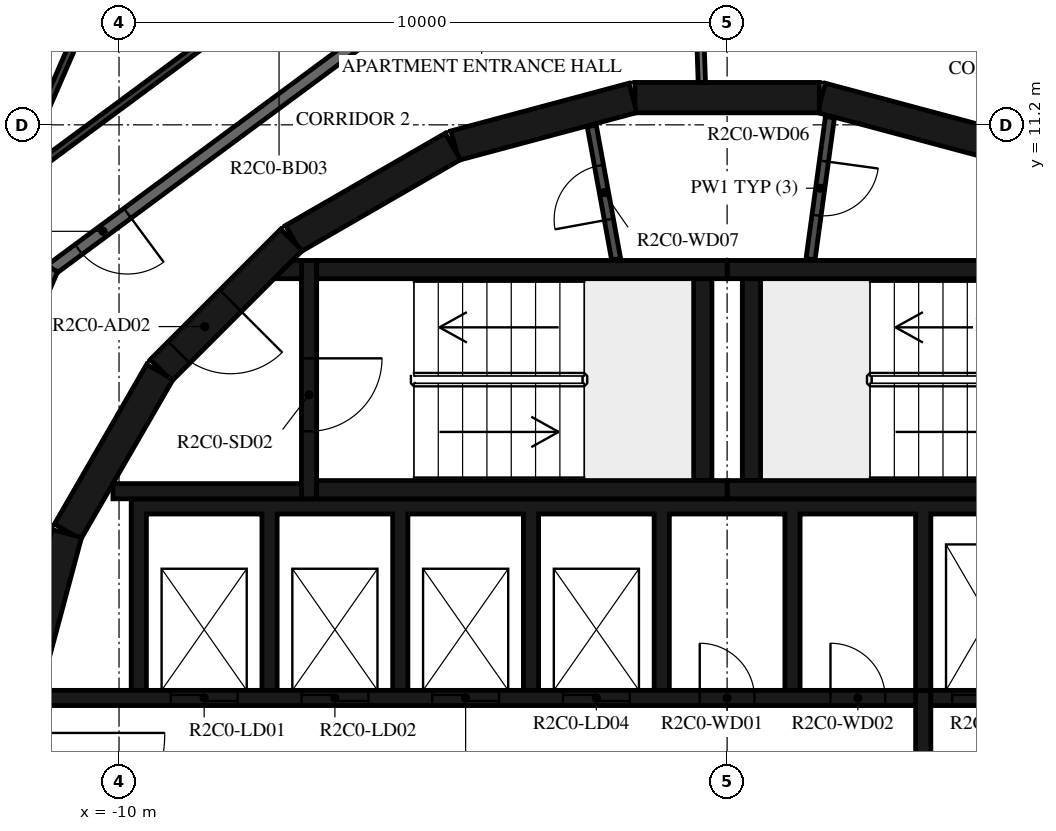
"""IFC4 building model, lengths in metres.
Left out: names, types, materials, properties, quantities, classifications, styles, units other than length and angle.
Written with IfcOpenShell. Run it as: python <this file> out.ifc"""

import sys

from ifc_helpers import new_model, si_unit, direction, frame, frame_2d, origin, place, context, subcontext, project, spatial, polyline, rectangle, outline, extrude, element, fill, save


model = new_model("IFC4")
c1 = context("Model", 3, precision=1e-05, world=origin(), true_north=direction((0.0, 1.0)))
c2 = subcontext(c1, "Body", "Model", "MODEL_VIEW")
j1 = project(units=[si_unit("LENGTHUNIT", "METRE"), si_unit("PLANEANGLEUNIT", "RADIAN")], contexts=[c1])
p1 = place(None, origin())
s1 = spatial("IfcSite", under=j1, at=p1, CompositionType="ELEMENT")
p2 = place(p1, origin())
s2 = spatial("IfcBuilding", under=s1, at=p2, CompositionType="ELEMENT")
p3 = place(p2, frame((0.0, 0.0, 104.7)))
s3 = spatial("IfcBuildingStorey", under=s2, at=p3, CompositionType="ELEMENT", Elevation=104.7)
for number, where, z_axis, x_axis in (
    (1, (4.479, 10.858, 0.0), (0.0, 0.0, 1.0), (-0.966, 0.259, 0.0)),
    (2, (1.516, 11.647, 0.0), (0.0, 0.0, 1.0), (-1.0, 0.0, 0.0)),
    (3, (-1.55, 11.643, 0.0), (0.0, 0.0, 1.0), (-0.966, -0.259, 0.0)),
    (4, (-4.51, 10.845, 0.0), (0.0, 0.0, 1.0), (-0.866, -0.5, 0.0)),
):
    element("IfcWall", number, at=place(p3, frame(where, z_axis=z_axis, x_axis=x_axis)), inside=s3, PredefinedType="SHEAR", context=c2, shape_type="SweptSolid", body=[
        extrude(rectangle(XDim=3.033, YDim=0.5, at=frame_2d((1.516, 0.0))), origin(), (0.0, 0.0, 1.0), 3.05),
    ])
p4 = place(p3, frame((-7.164, 9.308, 0.0), z_axis=(0.0, 0.0, 1.0), x_axis=(-0.707106781187, -0.707106781187, 0.0)))
e5 = element("IfcWall", 5, at=p4, inside=s3, PredefinedType="SHEAR", context=c2, shape_type="SweptSolid", body=[
    extrude(rectangle(XDim=3.032, YDim=0.5, at=frame_2d((1.516, 0.0))), origin(), (0.0, 0.0, 1.0), 3.05),
])
p5 = place(p4, frame((1.416, 0.0, 0.0)))
e6 = element("IfcOpeningElement", 6, at=p5, cuts=e5, PredefinedType="OPENING", context=c2, shape_type="SweptSolid", body=[
    extrude(rectangle(XDim=1.2, YDim=2.1, at=frame_2d((0.6, 1.05))), frame((0.0, 0.26, 0.0), z_axis=(0.0, -1.0, 0.0), x_axis=(1.0, 0.0, 0.0)), (0.0, 0.0, 1.0), 0.52),
])
for number, where, z_axis, x_axis in (
    (7, (-9.329, 7.137, 0.0), (0.0, 0.0, 1.0), (-0.5, -0.866, 0.0)),
    (8, (-10.858, 4.479, 0.0), (0.0, 0.0, 1.0), (-0.259, -0.966, 0.0)),
):
    element("IfcWall", number, at=place(p3, frame(where, z_axis=z_axis, x_axis=x_axis)), inside=s3, PredefinedType="SHEAR", context=c2, shape_type="SweptSolid", body=[
        extrude(rectangle(XDim=3.033, YDim=0.5, at=frame_2d((1.516, 0.0))), origin(), (0.0, 0.0, 1.0), 3.05),
    ])
for number, where, z_axis, x_axis in (
    (9, (0.0, 5.2, 0.0), (0.0, 0.0, 1.0), (1.0, 0.0, 0.0)),
    (10, (0.0, 8.82, 0.0), (0.0, 0.0, 1.0), (1.0, 0.0, 0.0)),
):
    element("IfcWall", number, at=place(p3, frame(where, z_axis=z_axis, x_axis=x_axis)), inside=s3, PredefinedType="SHEAR", context=c2, shape_type="SweptSolid", body=[
        extrude(rectangle(XDim=6.75, YDim=0.3, at=frame_2d((3.375, 0.0))), origin(), (0.0, 0.0, 1.0), 3.05),
    ])
p6 = place(p3, frame((0.4, 5.35, 0.0), z_axis=(0.0, 0.0, 1.0), x_axis=(0.0, 1.0, 0.0)))
e11 = element("IfcWall", 11, at=p6, inside=s3, PredefinedType="SHEAR", context=c2, shape_type="SweptSolid", body=[
    extrude(rectangle(XDim=3.32, YDim=0.3, at=frame_2d((1.66, 0.0))), origin(), (0.0, 0.0, 1.0), 3.05),
])
for number, where, z_axis, x_axis in (
    (12, (-6.75, 5.2, 0.0), (0.0, 0.0, 1.0), (1.0, 0.0, 0.0)),
    (13, (-6.75, 8.82, 0.0), (0.0, 0.0, 1.0), (1.0, 0.0, 0.0)),
):
    element("IfcWall", number, at=place(p3, frame(where, z_axis=z_axis, x_axis=x_axis)), inside=s3, PredefinedType="SHEAR", context=c2, shape_type="SweptSolid", body=[
        extrude(rectangle(XDim=6.75, YDim=0.3, at=frame_2d((3.375, 0.0))), origin(), (0.0, 0.0, 1.0), 3.05),
    ])
p7 = place(p3, frame((-0.4, 5.35, 0.0), z_axis=(0.0, 0.0, 1.0), x_axis=(0.0, 1.0, 0.0)))
e14 = element("IfcWall", 14, at=p7, inside=s3, PredefinedType="SHEAR", context=c2, shape_type="SweptSolid", body=[
    extrude(rectangle(XDim=3.32, YDim=0.3, at=frame_2d((1.66, 0.0))), origin(), (0.0, 0.0, 1.0), 3.05),
])
p8 = place(p3, frame((-6.875, 8.97, 0.0), z_axis=(0.0, 0.0, 1.0), x_axis=(0.0, -1.0, 0.0)))
e15 = element("IfcWall", 15, at=p8, inside=s3, PredefinedType="SHEAR", context=c2, shape_type="SweptSolid", body=[
    extrude(rectangle(XDim=3.92, YDim=0.25, at=frame_2d((1.96, 0.0))), origin(), (0.0, 0.0, 1.0), 3.05),
])
p9 = place(p8, frame((1.61, 0.0, 0.0)))
e16 = element("IfcOpeningElement", 16, at=p9, cuts=e15, PredefinedType="OPENING", context=c2, shape_type="SweptSolid", body=[
    extrude(rectangle(XDim=1.2, YDim=2.1, at=frame_2d((0.6, 1.05))), frame((0.0, 0.135, 0.0), z_axis=(0.0, -1.0, 0.0), x_axis=(1.0, 0.0, 0.0)), (0.0, 0.0, 1.0), 0.27),
])
p10 = place(p3, frame((-7.0, 5.175, 0.0), z_axis=(0.0, 0.0, 1.0), x_axis=(-1.0, 0.0, 0.0)))
e17 = element("IfcWall", 17, at=p10, inside=s3, PredefinedType="SHEAR", context=c2, shape_type="SweptSolid", body=[
    extrude(rectangle(XDim=3.1, YDim=0.25, at=frame_2d((1.55, 0.0))), origin(), (0.0, 0.0, 1.0), 3.05),
])
p11 = place(p3, origin())
e18 = element("IfcWall", 18, at=p11, inside=s3, PredefinedType="SHEAR", context=c2, shape_type="SweptSolid", body=[
    extrude(outline(polyline([(-7.148, 8.97), (-7.0, 8.97), (-7.0, 8.67), (-7.448, 8.67), (-7.148, 8.97)])), origin(), (0.0, 0.0, 1.0), 3.05),
])
p12 = place(p3, origin())
e19 = element("IfcWall", 19, at=p12, inside=s3, PredefinedType="SHEAR", context=c2, shape_type="SweptSolid", body=[
    extrude(outline(polyline([(-9.55, 4.8), (-7.65, 4.8), (-7.65, 1.9), (-7.4, 1.9), (-7.4, 4.8), (-5.5, 4.8), (-5.5, 1.9), (-5.25, 1.9), (-5.25, 4.8), (-3.35, 4.8), (-3.35, 1.9), (-3.1, 1.9), (-3.1, 4.8), (-1.2, 4.8), (-1.2, 1.9), (-0.95, 1.9), (-0.95, 4.8), (0.95, 4.8), (0.95, 1.9), (1.2, 1.9), (1.2, 4.8), (3.1, 4.8), (3.1, 1.9), (3.35, 1.9), (3.35, 4.8), (5.25, 4.8), (5.25, 1.9), (5.5, 1.9), (5.5, 4.8), (7.4, 4.8), (7.4, 1.9), (7.65, 1.9), (7.65, 4.8), (9.55, 4.8), (9.55, 1.9), (9.8, 1.9), (9.8, 4.8), (9.8, 5.05), (-9.8, 5.05), (-9.8, 4.8), (-9.8, 1.9), (-9.55, 1.9), (-9.55, 4.8)])), origin(), (0.0, 0.0, 1.0), 3.05),
])
p13 = place(p3, frame((-11.28, 1.775, 0.0), z_axis=(0.0, 0.0, 1.0), x_axis=(1.0, 0.0, 0.0)))
e20 = element("IfcWall", 20, at=p13, inside=s3, PredefinedType="SHEAR", context=c2, shape_type="SweptSolid", body=[
    extrude(rectangle(XDim=14.38, YDim=0.25, at=frame_2d((7.19, 0.0))), origin(), (0.0, 0.0, 1.0), 3.05),
])
p14 = place(p13, frame((2.13, 0.0, 0.0)))
e21 = element("IfcOpeningElement", 21, at=p14, cuts=e20, PredefinedType="OPENING", context=c2, shape_type="SweptSolid", body=[
    extrude(rectangle(XDim=1.1, YDim=2.1, at=frame_2d((0.55, 1.05))), frame((0.0, 0.135, 0.0), z_axis=(0.0, -1.0, 0.0), x_axis=(1.0, 0.0, 0.0)), (0.0, 0.0, 1.0), 0.27),
])
p15 = place(p13, frame((4.28, 0.0, 0.0)))
e22 = element("IfcOpeningElement", 22, at=p15, cuts=e20, PredefinedType="OPENING", context=c2, shape_type="SweptSolid", body=[
    extrude(rectangle(XDim=1.1, YDim=2.1, at=frame_2d((0.55, 1.05))), frame((0.0, 0.135, 0.0), z_axis=(0.0, -1.0, 0.0), x_axis=(1.0, 0.0, 0.0)), (0.0, 0.0, 1.0), 0.27),
])
p16 = place(p13, frame((6.43, 0.0, 0.0)))
e23 = element("IfcOpeningElement", 23, at=p16, cuts=e20, PredefinedType="OPENING", context=c2, shape_type="SweptSolid", body=[
    extrude(rectangle(XDim=1.1, YDim=2.1, at=frame_2d((0.55, 1.05))), frame((0.0, 0.135, 0.0), z_axis=(0.0, -1.0, 0.0), x_axis=(1.0, 0.0, 0.0)), (0.0, 0.0, 1.0), 0.27),
])
p17 = place(p13, frame((8.58, 0.0, 0.0)))
e24 = element("IfcOpeningElement", 24, at=p17, cuts=e20, PredefinedType="OPENING", context=c2, shape_type="SweptSolid", body=[
    extrude(rectangle(XDim=1.1, YDim=2.1, at=frame_2d((0.55, 1.05))), frame((0.0, 0.135, 0.0), z_axis=(0.0, -1.0, 0.0), x_axis=(1.0, 0.0, 0.0)), (0.0, 0.0, 1.0), 0.27),
])
p18 = place(p13, frame((10.83, 0.0, 0.0)))
e25 = element("IfcOpeningElement", 25, at=p18, cuts=e20, PredefinedType="OPENING", context=c2, shape_type="SweptSolid", body=[
    extrude(rectangle(XDim=0.9, YDim=2.1, at=frame_2d((0.45, 1.05))), frame((0.0, 0.135, 0.0), z_axis=(0.0, -1.0, 0.0), x_axis=(1.0, 0.0, 0.0)), (0.0, 0.0, 1.0), 0.27),
])
p19 = place(p13, frame((12.98, 0.0, 0.0)))
e26 = element("IfcOpeningElement", 26, at=p19, cuts=e20, PredefinedType="OPENING", context=c2, shape_type="SweptSolid", body=[
    extrude(rectangle(XDim=0.9, YDim=2.1, at=frame_2d((0.45, 1.05))), frame((0.0, 0.135, 0.0), z_axis=(0.0, -1.0, 0.0), x_axis=(1.0, 0.0, 0.0)), (0.0, 0.0, 1.0), 0.27),
])
p20 = place(p3, frame((3.35, 1.775, 0.0), z_axis=(0.0, 0.0, 1.0), x_axis=(1.0, 0.0, 0.0)))
e27 = element("IfcWall", 27, at=p20, inside=s3, PredefinedType="SHEAR", context=c2, shape_type="SweptSolid", body=[
    extrude(rectangle(XDim=7.93, YDim=0.25, at=frame_2d((3.965, 0.0))), origin(), (0.0, 0.0, 1.0), 3.05),
])
p21 = place(p20, frame((0.35, 0.0, 0.0)))
e28 = element("IfcOpeningElement", 28, at=p21, cuts=e27, PredefinedType="OPENING", context=c2, shape_type="SweptSolid", body=[
    extrude(rectangle(XDim=1.2, YDim=2.4, at=frame_2d((0.6, 1.2))), frame((0.0, 0.135, 0.0), z_axis=(0.0, -1.0, 0.0), x_axis=(1.0, 0.0, 0.0)), (0.0, 0.0, 1.0), 0.27),
])
p22 = place(p20, frame((2.5, 0.0, 0.0)))
e29 = element("IfcOpeningElement", 29, at=p22, cuts=e27, PredefinedType="OPENING", context=c2, shape_type="SweptSolid", body=[
    extrude(rectangle(XDim=1.2, YDim=2.4, at=frame_2d((0.6, 1.2))), frame((0.0, 0.135, 0.0), z_axis=(0.0, -1.0, 0.0), x_axis=(1.0, 0.0, 0.0)), (0.0, 0.0, 1.0), 0.27),
])
p23 = place(p20, frame((4.8, 0.0, 0.0)))
e30 = element("IfcOpeningElement", 30, at=p23, cuts=e27, PredefinedType="OPENING", context=c2, shape_type="SweptSolid", body=[
    extrude(rectangle(XDim=0.9, YDim=2.1, at=frame_2d((0.45, 1.05))), frame((0.0, 0.135, 0.0), z_axis=(0.0, -1.0, 0.0), x_axis=(1.0, 0.0, 0.0)), (0.0, 0.0, 1.0), 0.27),
])
p24 = place(p3, frame((3.225, -1.9, 0.0), z_axis=(0.0, 0.0, 1.0), x_axis=(0.0, 1.0, 0.0)))
e31 = element("IfcWall", 31, at=p24, inside=s3, PredefinedType="SHEAR", context=c2, shape_type="SweptSolid", body=[
    extrude(rectangle(XDim=3.8, YDim=0.25, at=frame_2d((1.9, 0.0))), origin(), (0.0, 0.0, 1.0), 3.05),
])
p25 = place(p3, frame((1.691, 11.326, 0.0), z_axis=(0.0, 0.0, 1.0), x_axis=(-0.135344253201, -0.990798633994, 0.0)))
e32 = element("IfcWall", 32, at=p25, inside=s3, PredefinedType="PARTITIONING", context=c2, shape_type="SweptSolid", body=[
    extrude(rectangle(XDim=2.358, YDim=0.15, at=frame_2d((1.179, 0.0))), origin(), (0.0, 0.0, 1.0), 3.05),
])
p26 = place(p25, frame((0.729, 0.0, 0.0)))
e33 = element("IfcOpeningElement", 33, at=p26, cuts=e32, PredefinedType="OPENING", context=c2, shape_type="SweptSolid", body=[
    extrude(rectangle(XDim=0.9, YDim=2.1, at=frame_2d((0.45, 1.05))), frame((0.0, 0.085, 0.0), z_axis=(0.0, -1.0, 0.0), x_axis=(1.0, 0.0, 0.0)), (0.0, 0.0, 1.0), 0.17),
])
p27 = place(p3, frame((-1.825, 8.99, 0.0), z_axis=(0.0, 0.0, 1.0), x_axis=(-0.179955206115, 0.983674805915, 0.0)))
e34 = element("IfcWall", 34, at=p27, inside=s3, PredefinedType="PARTITIONING", context=c2, shape_type="SweptSolid", body=[
    extrude(rectangle(XDim=2.229, YDim=0.15, at=frame_2d((1.115, 0.0))), origin(), (0.0, 0.0, 1.0), 3.05),
])
p28 = place(p27, frame((0.665, 0.0, 0.0)))
e35 = element("IfcOpeningElement", 35, at=p28, cuts=e34, PredefinedType="OPENING", context=c2, shape_type="SweptSolid", body=[
    extrude(rectangle(XDim=0.9, YDim=2.1, at=frame_2d((0.45, 1.05))), frame((0.0, 0.085, 0.0), z_axis=(0.0, -1.0, 0.0), x_axis=(1.0, 0.0, 0.0)), (0.0, 0.0, 1.0), 0.17),
])
p29 = place(p3, frame((-0.479, 13.734, 0.0), z_axis=(0.0, 0.0, 1.0), x_axis=(0.034805430832, -0.999394107439, 0.0)))
e36 = element("IfcWall", 36, at=p29, inside=s3, PredefinedType="PARTITIONING", context=c2, shape_type="SweptSolid", body=[
    extrude(rectangle(XDim=1.838, YDim=0.12, at=frame_2d((0.919, 0.0))), origin(), (0.0, 0.0, 1.0), 3.05),
])
p30 = place(p29, frame((0.115, 0.0, 0.0)))
e37 = element("IfcOpeningElement", 37, at=p30, cuts=e36, PredefinedType="OPENING", context=c2, shape_type="SweptSolid", body=[
    extrude(rectangle(XDim=1.2, YDim=2.1, at=frame_2d((0.6, 1.05))), frame((0.0, 0.07, 0.0), z_axis=(0.0, -1.0, 0.0), x_axis=(1.0, 0.0, 0.0)), (0.0, 0.0, 1.0), 0.14),
])
p31 = place(p3, frame((8.736, 11.141, 0.0), z_axis=(0.0, 0.0, 1.0), x_axis=(-0.917051290697, 0.398769269416, 0.0)))
e38 = element("IfcWall", 38, at=p31, inside=s3, PredefinedType="STANDARD", context=c2, shape_type="SweptSolid", body=[
    extrude(rectangle(XDim=7.24, YDim=0.2, at=frame_2d((3.62, 0.0))), origin(), (0.0, 0.0, 1.0), 3.05),
])
p32 = place(p31, frame((0.2, 0.0, 0.0)))
e39 = element("IfcOpeningElement", 39, at=p32, cuts=e38, PredefinedType="OPENING", context=c2, shape_type="SweptSolid", body=[
    extrude(rectangle(XDim=1.0, YDim=2.1, at=frame_2d((0.5, 1.05))), frame((0.0, 0.11, 0.0), z_axis=(0.0, -1.0, 0.0), x_axis=(1.0, 0.0, 0.0)), (0.0, 0.0, 1.0), 0.22),
])
p33 = place(p3, frame((-5.198, 13.196, 0.0), z_axis=(0.0, 0.0, 1.0), x_axis=(-0.803869883159, -0.594805187394, 0.0)))
e40 = element("IfcWall", 40, at=p33, inside=s3, PredefinedType="STANDARD", context=c2, shape_type="SweptSolid", body=[
    extrude(rectangle(XDim=7.342, YDim=0.2, at=frame_2d((3.671, 0.0))), origin(), (0.0, 0.0, 1.0), 3.05),
])
p34 = place(p33, frame((5.8, 0.0, 0.0)))
e41 = element("IfcOpeningElement", 41, at=p34, cuts=e40, PredefinedType="OPENING", context=c2, shape_type="SweptSolid", body=[
    extrude(rectangle(XDim=1.0, YDim=2.1, at=frame_2d((0.5, 1.05))), frame((0.0, 0.11, 0.0), z_axis=(0.0, -1.0, 0.0), x_axis=(1.0, 0.0, 0.0)), (0.0, 0.0, 1.0), 0.22),
])
p35 = place(p3, frame((-11.1, 8.829, 0.0), z_axis=(0.0, 0.0, 1.0), x_axis=(-0.398741918631, -0.917063183388, 0.0)))
e42 = element("IfcWall", 42, at=p35, inside=s3, PredefinedType="STANDARD", context=c2, shape_type="SweptSolid", body=[
    extrude(rectangle(XDim=7.342, YDim=0.2, at=frame_2d((3.671, 0.0))), origin(), (0.0, 0.0, 1.0), 3.05),
])
p36 = place(p3, frame((9.796, 12.315, 0.0), z_axis=(0.0, 0.0, 1.0), x_axis=(-0.917059572812, 0.398750222463, 0.0)))
e43 = element("IfcWall", 43, at=p36, inside=s3, PredefinedType="PARTITIONING", context=c2, shape_type="SweptSolid", body=[
    extrude(rectangle(XDim=8.146, YDim=0.12, at=frame_2d((4.073, 0.0))), origin(), (0.0, 0.0, 1.0), 3.05),
])
p37 = place(p36, frame((2.185, 0.0, 0.0)))
e44 = element("IfcOpeningElement", 44, at=p37, cuts=e43, PredefinedType="OPENING", context=c2, shape_type="SweptSolid", body=[
    extrude(rectangle(XDim=0.8, YDim=2.1, at=frame_2d((0.4, 1.05))), frame((0.0, 0.07, 0.0), z_axis=(0.0, -1.0, 0.0), x_axis=(1.0, 0.0, 0.0)), (0.0, 0.0, 1.0), 0.14),
])
p38 = place(p3, frame((-5.767, 14.641, 0.0), z_axis=(0.0, 0.0, 1.0), x_axis=(-0.803853364238, -0.594827511807, 0.0)))
e45 = element("IfcWall", 45, at=p38, inside=s3, PredefinedType="PARTITIONING", context=c2, shape_type="SweptSolid", body=[
    extrude(rectangle(XDim=8.146, YDim=0.12, at=frame_2d((4.073, 0.0))), origin(), (0.0, 0.0, 1.0), 3.05),
])
p39 = place(p38, frame((1.592, 0.0, 0.0)))
e46 = element("IfcOpeningElement", 46, at=p39, cuts=e45, PredefinedType="OPENING", context=c2, shape_type="SweptSolid", body=[
    extrude(rectangle(XDim=0.8, YDim=2.1, at=frame_2d((0.4, 1.05))), frame((0.0, 0.07, 0.0), z_axis=(0.0, -1.0, 0.0), x_axis=(1.0, 0.0, 0.0)), (0.0, 0.0, 1.0), 0.14),
])
p40 = place(p3, frame((-5.952, 23.571, 0.0), z_axis=(0.0, 0.0, 1.0), x_axis=(-0.398745097158, -0.917061801348, 0.0)))
e47 = element("IfcWall", 47, at=p40, inside=s3, PredefinedType="PARTITIONING", context=c2, shape_type="SweptSolid", body=[
    extrude(rectangle(XDim=14.576, YDim=0.12, at=frame_2d((7.288, 0.0))), origin(), (0.0, 0.0, 1.0), 3.05),
])
p41 = place(p40, frame((3.878, 0.0, 0.0)))
e48 = element("IfcOpeningElement", 48, at=p41, cuts=e47, PredefinedType="OPENING", context=c2, shape_type="SweptSolid", body=[
    extrude(rectangle(XDim=0.9, YDim=2.1, at=frame_2d((0.45, 1.05))), frame((0.0, 0.07, 0.0), z_axis=(0.0, -1.0, 0.0), x_axis=(1.0, 0.0, 0.0)), (0.0, 0.0, 1.0), 0.14),
])
p42 = place(p40, frame((0.2, 0.0, 0.0)))
e49 = element("IfcOpeningElement", 49, at=p42, cuts=e47, PredefinedType="OPENING", context=c2, shape_type="SweptSolid", body=[
    extrude(rectangle(XDim=0.9, YDim=2.1, at=frame_2d((0.45, 1.05))), frame((0.0, 0.07, 0.0), z_axis=(0.0, -1.0, 0.0), x_axis=(1.0, 0.0, 0.0)), (0.0, 0.0, 1.0), 0.14),
])
p43 = place(p9, origin())
e50 = element("IfcDoor", 50, at=p43, inside=s3, OperationType="SINGLE_SWING_LEFT", PredefinedType="DOOR", context=c2, shape_type="SweptSolid", body=[
    extrude(rectangle(XDim=1.2, YDim=2.1, at=frame_2d((0.6, 1.05))), frame((0.0, 0.025, 0.0), z_axis=(0.0, -1.0, 0.0), x_axis=(1.0, 0.0, 0.0)), (0.0, 0.0, 1.0), 0.05),
])
fill(e16, e50)
p44 = place(p5, origin())
e51 = element("IfcDoor", 51, at=p44, inside=s3, OperationType="SINGLE_SWING_RIGHT", PredefinedType="DOOR", context=c2, shape_type="SweptSolid", body=[
    extrude(rectangle(XDim=1.2, YDim=2.1, at=frame_2d((0.6, 1.05))), frame((0.0, 0.025, 0.0), z_axis=(0.0, -1.0, 0.0), x_axis=(1.0, 0.0, 0.0)), (0.0, 0.0, 1.0), 0.05),
])
fill(e6, e51)
p45 = place(p14, origin())
e52 = element("IfcDoor", 52, at=p45, inside=s3, OperationType="DOUBLE_DOOR_SLIDING", PredefinedType="DOOR", context=c2, shape_type="SweptSolid", body=[
    extrude(rectangle(XDim=1.1, YDim=2.1, at=frame_2d((0.55, 1.05))), frame((0.0, 0.025, 0.0), z_axis=(0.0, -1.0, 0.0), x_axis=(1.0, 0.0, 0.0)), (0.0, 0.0, 1.0), 0.05),
])
fill(e21, e52)
p46 = place(p15, origin())
e53 = element("IfcDoor", 53, at=p46, inside=s3, OperationType="DOUBLE_DOOR_SLIDING", PredefinedType="DOOR", context=c2, shape_type="SweptSolid", body=[
    extrude(rectangle(XDim=1.1, YDim=2.1, at=frame_2d((0.55, 1.05))), frame((0.0, 0.025, 0.0), z_axis=(0.0, -1.0, 0.0), x_axis=(1.0, 0.0, 0.0)), (0.0, 0.0, 1.0), 0.05),
])
fill(e22, e53)
p47 = place(p16, origin())
e54 = element("IfcDoor", 54, at=p47, inside=s3, OperationType="DOUBLE_DOOR_SLIDING", PredefinedType="DOOR", context=c2, shape_type="SweptSolid", body=[
    extrude(rectangle(XDim=1.1, YDim=2.1, at=frame_2d((0.55, 1.05))), frame((0.0, 0.025, 0.0), z_axis=(0.0, -1.0, 0.0), x_axis=(1.0, 0.0, 0.0)), (0.0, 0.0, 1.0), 0.05),
])
fill(e23, e54)
p48 = place(p17, origin())
e55 = element("IfcDoor", 55, at=p48, inside=s3, OperationType="DOUBLE_DOOR_SLIDING", PredefinedType="DOOR", context=c2, shape_type="SweptSolid", body=[
    extrude(rectangle(XDim=1.1, YDim=2.1, at=frame_2d((0.55, 1.05))), frame((0.0, 0.025, 0.0), z_axis=(0.0, -1.0, 0.0), x_axis=(1.0, 0.0, 0.0)), (0.0, 0.0, 1.0), 0.05),
])
fill(e24, e55)
p49 = place(p21, origin())
e56 = element("IfcDoor", 56, at=p49, inside=s3, OperationType="DOUBLE_DOOR_SLIDING", PredefinedType="DOOR", context=c2, shape_type="SweptSolid", body=[
    extrude(rectangle(XDim=1.2, YDim=2.4, at=frame_2d((0.6, 1.2))), frame((0.0, 0.025, 0.0), z_axis=(0.0, -1.0, 0.0), x_axis=(1.0, 0.0, 0.0)), (0.0, 0.0, 1.0), 0.05),
])
fill(e28, e56)
p50 = place(p18, origin())
e57 = element("IfcDoor", 57, at=p50, inside=s3, OperationType="SINGLE_SWING_RIGHT", PredefinedType="DOOR", context=c2, shape_type="SweptSolid", body=[
    extrude(rectangle(XDim=0.9, YDim=2.1, at=frame_2d((0.45, 1.05))), frame((0.0, 0.025, 0.0), z_axis=(0.0, -1.0, 0.0), x_axis=(1.0, 0.0, 0.0)), (0.0, 0.0, 1.0), 0.05),
])
fill(e25, e57)
p51 = place(p19, origin())
e58 = element("IfcDoor", 58, at=p51, inside=s3, OperationType="SINGLE_SWING_LEFT", PredefinedType="DOOR", context=c2, shape_type="SweptSolid", body=[
    extrude(rectangle(XDim=0.9, YDim=2.1, at=frame_2d((0.45, 1.05))), frame((0.0, 0.025, 0.0), z_axis=(0.0, -1.0, 0.0), x_axis=(1.0, 0.0, 0.0)), (0.0, 0.0, 1.0), 0.05),
])
fill(e26, e58)
p52 = place(p26, origin())
e59 = element("IfcDoor", 59, at=p52, inside=s3, OperationType="SINGLE_SWING_LEFT", PredefinedType="DOOR", context=c2, shape_type="SweptSolid", body=[
    extrude(rectangle(XDim=0.9, YDim=2.1, at=frame_2d((0.45, 1.05))), frame((0.0, 0.025, 0.0), z_axis=(0.0, -1.0, 0.0), x_axis=(1.0, 0.0, 0.0)), (0.0, 0.0, 1.0), 0.05),
])
fill(e33, e59)
p53 = place(p28, origin())
e60 = element("IfcDoor", 60, at=p53, inside=s3, OperationType="SINGLE_SWING_RIGHT", PredefinedType="DOOR", context=c2, shape_type="SweptSolid", body=[
    extrude(rectangle(XDim=0.9, YDim=2.1, at=frame_2d((0.45, 1.05))), frame((0.0, 0.025, 0.0), z_axis=(0.0, -1.0, 0.0), x_axis=(1.0, 0.0, 0.0)), (0.0, 0.0, 1.0), 0.05),
])
fill(e35, e60)
p54 = place(p34, origin())
e61 = element("IfcDoor", 61, at=p54, inside=s3, OperationType="SINGLE_SWING_LEFT", PredefinedType="DOOR", context=c2, shape_type="SweptSolid", body=[
    extrude(rectangle(XDim=1.0, YDim=2.1, at=frame_2d((0.5, 1.05))), frame((0.0, 0.025, 0.0), z_axis=(0.0, -1.0, 0.0), x_axis=(1.0, 0.0, 0.0)), (0.0, 0.0, 1.0), 0.05),
])
fill(e41, e61)
save(model, sys.argv[1])
